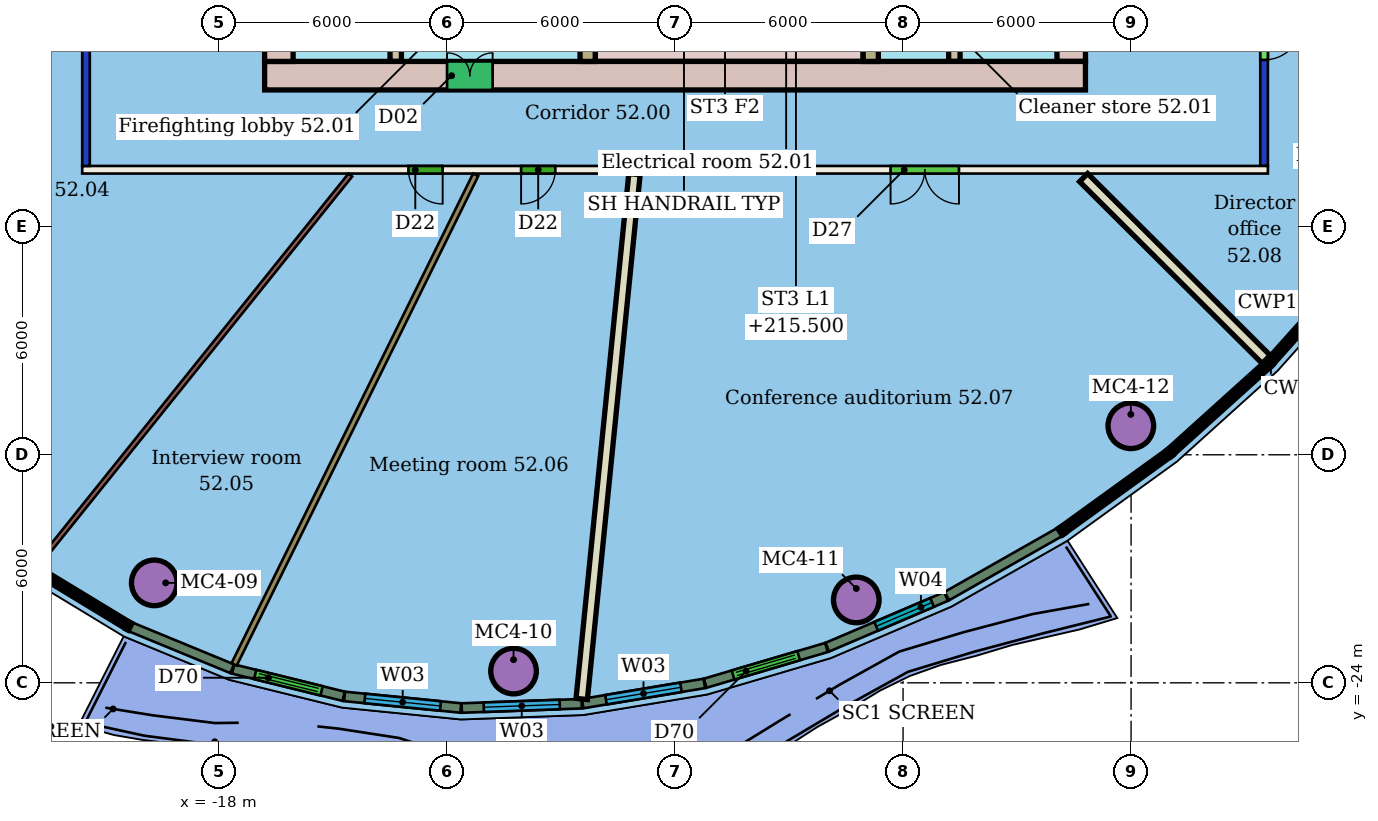
"""IFC4 building model, lengths in metres.
Left out: names, types, materials, properties, quantities, classifications, styles, units other than length and angle.
Written with IfcOpenShell. Run it as: python <this file> out.ifc"""

import sys

from ifc_helpers import new_model, si_unit, direction, frame, frame_2d, origin, origin_2d, place, context, subcontext, project, spatial, rectangle, hollow_circle, extrude, element, fill, save


model = new_model("IFC4")
c1 = context("Model", 3, precision=1e-05, world=origin(), true_north=direction((0.0, 1.0)))
c2 = subcontext(c1, "Body", "Model", "MODEL_VIEW")
j1 = project(units=[si_unit("LENGTHUNIT", "METRE"), si_unit("PLANEANGLEUNIT", "RADIAN")], contexts=[c1])
p1 = place(None, origin())
s1 = spatial("IfcSite", under=j1, at=p1, CompositionType="ELEMENT")
p2 = place(p1, origin())
s2 = spatial("IfcBuilding", under=s1, at=p2, CompositionType="ELEMENT")
p3 = place(p2, frame((0.0, 0.0, 213.7)))
s3 = spatial("IfcBuildingStorey", under=s2, at=p3, CompositionType="ELEMENT", Elevation=213.7)
for number, where, z_axis, x_axis in (
    (1, (-19.704, -21.37, 0.0), (0.0, 0.0, 1.0), (1.0, 0.0, 0.0)),
    (2, (-10.25, -23.691, 0.0), (0.0, 0.0, 1.0), (1.0, 0.0, 0.0)),
    (3, (-1.231, -21.819, 0.0), (0.0, 0.0, 1.0), (1.0, 0.0, 0.0)),
    (4, (5.993, -17.237, 0.0), (0.0, 0.0, 1.0), (1.0, 0.0, 0.0)),
):
    element("IfcColumn", number, at=place(p3, frame(where, z_axis=z_axis, x_axis=x_axis)), inside=s3, PredefinedType="COLUMN", context=c2, shape_type="SweptSolid", body=[
        extrude(hollow_circle(Radius=0.6, WallThickness=0.045, at=origin_2d()), origin(), (0.0, 0.0, 1.0), 3.45),
    ])
p4 = place(p3, frame((9.6, -10.5, 0.0), z_axis=(0.0, 0.0, 1.0), x_axis=(-1.0, 0.0, 0.0)))
e5 = element("IfcWall", 5, at=p4, inside=s3, PredefinedType="PARTITIONING", context=c2, shape_type="SweptSolid", body=[
    extrude(rectangle(XDim=31.2, YDim=0.2, at=frame_2d((15.6, 0.0))), origin(), (0.0, 0.0, 1.0), 3.45),
])
p5 = place(p4, frame((21.715, 0.0, 0.0)))
e6 = element("IfcOpeningElement", 6, at=p5, cuts=e5, PredefinedType="OPENING", context=c2, shape_type="SweptSolid", body=[
    extrude(rectangle(XDim=0.9, YDim=2.1, at=frame_2d((0.45, 1.05))), frame((0.0, 0.11, 0.0), z_axis=(0.0, -1.0, 0.0), x_axis=(1.0, 0.0, 0.0)), (0.0, 0.0, 1.0), 0.22),
])
p6 = place(p4, frame((18.751, 0.0, 0.0)))
e7 = element("IfcOpeningElement", 7, at=p6, cuts=e5, PredefinedType="OPENING", context=c2, shape_type="SweptSolid", body=[
    extrude(rectangle(XDim=0.9, YDim=2.1, at=frame_2d((0.45, 1.05))), frame((0.0, 0.11, 0.0), z_axis=(0.0, -1.0, 0.0), x_axis=(1.0, 0.0, 0.0)), (0.0, 0.0, 1.0), 0.22),
])
p7 = place(p4, frame((8.129, 0.0, 0.0)))
e8 = element("IfcOpeningElement", 8, at=p7, cuts=e5, PredefinedType="OPENING", context=c2, shape_type="SweptSolid", body=[
    extrude(rectangle(XDim=1.8, YDim=2.4, at=frame_2d((0.9, 1.2))), frame((0.0, 0.11, 0.0), z_axis=(0.0, -1.0, 0.0), x_axis=(1.0, 0.0, 0.0)), (0.0, 0.0, 1.0), 0.22),
])
p8 = place(p3, frame((-21.5, -10.4, 0.0), z_axis=(0.0, 0.0, 1.0), x_axis=(0.0, 1.0, 0.0)))
e9 = element("IfcWall", 9, at=p8, inside=s3, PredefinedType="PARTITIONING", context=c2, shape_type="SweptSolid", body=[
    extrude(rectangle(XDim=20.8, YDim=0.2, at=frame_2d((10.4, 0.0))), origin(), (0.0, 0.0, 1.0), 3.05),
])
p9 = place(p8, frame((6.094, 0.0, 0.0)))
e10 = element("IfcOpeningElement", 10, at=p9, cuts=e9, PredefinedType="OPENING", context=c2, shape_type="SweptSolid", body=[
    extrude(rectangle(XDim=1.8, YDim=2.1, at=frame_2d((0.9, 1.05))), frame((0.0, 0.11, 0.0), z_axis=(0.0, -1.0, 0.0), x_axis=(1.0, 0.0, 0.0)), (0.0, 0.0, 1.0), 0.22),
])
p10 = place(p3, frame((9.5, 10.4, 0.0), z_axis=(0.0, 0.0, 1.0), x_axis=(0.0, -1.0, 0.0)))
e11 = element("IfcWall", 11, at=p10, inside=s3, PredefinedType="PARTITIONING", context=c2, shape_type="SweptSolid", body=[
    extrude(rectangle(XDim=20.8, YDim=0.2, at=frame_2d((10.4, 0.0))), origin(), (0.0, 0.0, 1.0), 3.05),
])
p11 = place(p10, frame((17.01, 0.0, 0.0)))
e12 = element("IfcOpeningElement", 12, at=p11, cuts=e11, PredefinedType="OPENING", context=c2, shape_type="SweptSolid", body=[
    extrude(rectangle(XDim=1.0, YDim=2.4, at=frame_2d((0.5, 1.2))), frame((0.0, 0.11, 0.0), z_axis=(0.0, -1.0, 0.0), x_axis=(1.0, 0.0, 0.0)), (0.0, 0.0, 1.0), 0.22),
])
p12 = place(p10, frame((11.015, 0.0, 0.0)))
e13 = element("IfcOpeningElement", 13, at=p12, cuts=e11, PredefinedType="OPENING", context=c2, shape_type="SweptSolid", body=[
    extrude(rectangle(XDim=1.5, YDim=2.1, at=frame_2d((0.75, 1.05))), frame((0.0, 0.11, 0.0), z_axis=(0.0, -1.0, 0.0), x_axis=(1.0, 0.0, 0.0)), (0.0, 0.0, 1.0), 0.22),
])
p13 = place(p3, frame((-22.786, -20.9, 0.0), z_axis=(0.0, 0.0, 1.0), x_axis=(0.626186985821, 0.779672917824, 0.0)))
e14 = element("IfcWall", 14, at=p13, inside=s3, PredefinedType="PARTITIONING", context=c2, shape_type="SweptSolid", body=[
    extrude(rectangle(XDim=13.161, YDim=0.125, at=frame_2d((6.581, 0.0))), origin(), (0.0, 0.0, 1.0), 3.45),
])
p14 = place(p3, frame((-17.603, -23.515, 0.0), z_axis=(0.0, 0.0, 1.0), x_axis=(0.442482556449, 0.896777111237, 0.0)))
e15 = element("IfcWall", 15, at=p14, inside=s3, PredefinedType="PARTITIONING", context=c2, shape_type="SweptSolid", body=[
    extrude(rectangle(XDim=14.365, YDim=0.15, at=frame_2d((7.182, 0.0))), origin(), (0.0, 0.0, 1.0), 3.45),
])
p15 = place(p3, frame((-8.456, -24.425, 0.0), z_axis=(0.0, 0.0, 1.0), x_axis=(0.100052305019, 0.994982178866, 0.0)))
e16 = element("IfcWall", 16, at=p15, inside=s3, PredefinedType="PARTITIONING", context=c2, shape_type="SweptSolid", body=[
    extrude(rectangle(XDim=13.879, YDim=0.3, at=frame_2d((6.94, 0.0))), origin(), (0.0, 0.0, 1.0), 3.45),
])
p16 = place(p3, frame((9.555, -15.49, 0.0), z_axis=(0.0, 0.0, 1.0), x_axis=(-0.708581751717, 0.705628727543, 0.0)))
e17 = element("IfcWall", 17, at=p16, inside=s3, PredefinedType="PARTITIONING", context=c2, shape_type="SweptSolid", body=[
    extrude(rectangle(XDim=6.779, YDim=0.3, at=frame_2d((3.39, 0.0))), origin(), (0.0, 0.0, 1.0), 3.45),
])
p17 = place(p3, frame((-20.323, -22.53, 0.0), z_axis=(0.0, 0.0, 1.0), x_axis=(0.924690360412, -0.380720024901, 0.0)))
e18 = element("IfcWall", 18, at=p17, inside=s3, PredefinedType="SOLIDWALL", context=c2, shape_type="SweptSolid", body=[
    extrude(rectangle(XDim=2.886, YDim=0.25, at=frame_2d((1.443, 0.0))), origin(), (0.0, 0.0, 1.0), 3.1),
])
p18 = place(p3, frame((-17.628, -23.637, 0.0), z_axis=(0.0, 0.0, 1.0), x_axis=(0.9709618668, -0.239234306113, 0.0)))
e19 = element("IfcWall", 19, at=p18, inside=s3, PredefinedType="SOLIDWALL", context=c2, shape_type="SweptSolid", body=[
    extrude(rectangle(XDim=2.994, YDim=0.25, at=frame_2d((1.497, 0.0))), origin(), (0.0, 0.0, 1.0), 3.1),
])
p19 = place(p18, frame((0.597, 0.0, 0.0)))
e20 = element("IfcOpeningElement", 20, at=p19, cuts=e19, PredefinedType="OPENING", context=c2, shape_type="SweptSolid", body=[
    extrude(rectangle(XDim=1.8, YDim=2.4, at=frame_2d((0.9, 1.2))), frame((0.0, 0.135, 0.0), z_axis=(0.0, -1.0, 0.0), x_axis=(1.0, 0.0, 0.0)), (0.0, 0.0, 1.0), 0.27),
])
p20 = place(p3, frame((-14.696, -24.358, 0.0), z_axis=(0.0, 0.0, 1.0), x_axis=(0.995081139356, -0.099063242917, 0.0)))
e21 = element("IfcWall", 21, at=p20, inside=s3, PredefinedType="SOLIDWALL", context=c2, shape_type="SweptSolid", body=[
    extrude(rectangle(XDim=3.073, YDim=0.25, at=frame_2d((1.537, 0.0))), origin(), (0.0, 0.0, 1.0), 3.1),
])
p21 = place(p20, frame((0.537, 0.0, 0.9)))
e22 = element("IfcOpeningElement", 22, at=p21, cuts=e21, PredefinedType="OPENING", context=c2, shape_type="SweptSolid", body=[
    extrude(rectangle(XDim=2.0, YDim=2.1, at=frame_2d((1.0, 1.05))), frame((0.0, 0.135, 0.0), z_axis=(0.0, -1.0, 0.0), x_axis=(1.0, 0.0, 0.0)), (0.0, 0.0, 1.0), 0.27),
])
p22 = place(p3, frame((-11.613, -24.663, 0.0), z_axis=(0.0, 0.0, 1.0), x_axis=(0.999351383862, 0.036011270096, 0.0)))
e23 = element("IfcWall", 23, at=p22, inside=s3, PredefinedType="SOLIDWALL", context=c2, shape_type="SweptSolid", body=[
    extrude(rectangle(XDim=3.159, YDim=0.25, at=frame_2d((1.58, 0.0))), origin(), (0.0, 0.0, 1.0), 3.1),
])
p23 = place(p22, frame((0.58, 0.0, 0.9)))
e24 = element("IfcOpeningElement", 24, at=p23, cuts=e23, PredefinedType="OPENING", context=c2, shape_type="SweptSolid", body=[
    extrude(rectangle(XDim=2.0, YDim=2.1, at=frame_2d((1.0, 1.05))), frame((0.0, 0.135, 0.0), z_axis=(0.0, -1.0, 0.0), x_axis=(1.0, 0.0, 0.0)), (0.0, 0.0, 1.0), 0.27),
])
p24 = place(p3, frame((-8.432, -24.547, 0.0), z_axis=(0.0, 0.0, 1.0), x_axis=(0.986515622096, 0.163667123641, 0.0)))
e25 = element("IfcWall", 25, at=p24, inside=s3, PredefinedType="SOLIDWALL", context=c2, shape_type="SweptSolid", body=[
    extrude(rectangle(XDim=3.246, YDim=0.25, at=frame_2d((1.623, 0.0))), origin(), (0.0, 0.0, 1.0), 3.1),
])
p25 = place(p24, frame((0.623, 0.0, 0.9)))
e26 = element("IfcOpeningElement", 26, at=p25, cuts=e25, PredefinedType="OPENING", context=c2, shape_type="SweptSolid", body=[
    extrude(rectangle(XDim=2.0, YDim=2.1, at=frame_2d((1.0, 1.05))), frame((0.0, 0.135, 0.0), z_axis=(0.0, -1.0, 0.0), x_axis=(1.0, 0.0, 0.0)), (0.0, 0.0, 1.0), 0.27),
])
p26 = place(p3, frame((-5.207, -24.011, 0.0), z_axis=(0.0, 0.0, 1.0), x_axis=(0.959226347216, 0.282639018548, 0.0)))
e27 = element("IfcWall", 27, at=p26, inside=s3, PredefinedType="SOLIDWALL", context=c2, shape_type="SweptSolid", body=[
    extrude(rectangle(XDim=3.327, YDim=0.25, at=frame_2d((1.664, 0.0))), origin(), (0.0, 0.0, 1.0), 3.1),
])
p27 = place(p26, frame((0.764, 0.0, 0.0)))
e28 = element("IfcOpeningElement", 28, at=p27, cuts=e27, PredefinedType="OPENING", context=c2, shape_type="SweptSolid", body=[
    extrude(rectangle(XDim=1.8, YDim=2.4, at=frame_2d((0.9, 1.2))), frame((0.0, 0.135, 0.0), z_axis=(0.0, -1.0, 0.0), x_axis=(1.0, 0.0, 0.0)), (0.0, 0.0, 1.0), 0.27),
])
p28 = place(p3, frame((-1.994, -23.063, 0.0), z_axis=(0.0, 0.0, 1.0), x_axis=(0.919690332373, 0.392644486195, 0.0)))
e29 = element("IfcWall", 29, at=p28, inside=s3, PredefinedType="SOLIDWALL", context=c2, shape_type="SweptSolid", body=[
    extrude(rectangle(XDim=3.399, YDim=0.25, at=frame_2d((1.699, 0.0))), origin(), (0.0, 0.0, 1.0), 3.1),
])
p29 = place(p28, frame((1.399, 0.0, 0.9)))
e30 = element("IfcOpeningElement", 30, at=p29, cuts=e29, PredefinedType="OPENING", context=c2, shape_type="SweptSolid", body=[
    extrude(rectangle(XDim=1.6, YDim=2.1, at=frame_2d((0.8, 1.05))), frame((0.0, 0.135, 0.0), z_axis=(0.0, -1.0, 0.0), x_axis=(1.0, 0.0, 0.0)), (0.0, 0.0, 1.0), 0.27),
])
p30 = place(p3, frame((1.152, -21.719, 0.0), z_axis=(0.0, 0.0, 1.0), x_axis=(0.869705841478, 0.493570409666, 0.0)))
e31 = element("IfcWall", 31, at=p30, inside=s3, PredefinedType="SOLIDWALL", context=c2, shape_type="SweptSolid", body=[
    extrude(rectangle(XDim=3.412, YDim=0.25, at=frame_2d((1.706, 0.0))), origin(), (0.0, 0.0, 1.0), 3.1),
])
p31 = place(p3, frame((-16.8, -8.025, 0.0), z_axis=(0.0, 0.0, 1.0), x_axis=(1.0, 0.0, 0.0)))
e32 = element("IfcWall", 32, at=p31, inside=s3, PredefinedType="SHEAR", context=c2, shape_type="SweptSolid", body=[
    extrude(rectangle(XDim=21.6, YDim=0.75, at=frame_2d((10.8, 0.0))), origin(), (0.0, 0.0, 1.0), 3.3),
])
p32 = place(p31, frame((4.8, 0.0, 0.0)))
e33 = element("IfcOpeningElement", 33, at=p32, cuts=e32, PredefinedType="OPENING", context=c2, shape_type="SweptSolid", body=[
    extrude(rectangle(XDim=1.2, YDim=2.1, at=frame_2d((0.6, 1.05))), frame((0.0, 0.385, 0.0), z_axis=(0.0, -1.0, 0.0), x_axis=(1.0, 0.0, 0.0)), (0.0, 0.0, 1.0), 0.77),
])
p33 = place(p3, frame((-16.425, 7.65, 0.0), z_axis=(0.0, 0.0, 1.0), x_axis=(0.0, -1.0, 0.0)))
e34 = element("IfcWall", 34, at=p33, inside=s3, PredefinedType="SHEAR", context=c2, shape_type="SweptSolid", body=[
    extrude(rectangle(XDim=15.3, YDim=0.75, at=frame_2d((7.65, 0.0))), origin(), (0.0, 0.0, 1.0), 3.3),
])
p34 = place(p33, frame((11.25, 0.0, 0.0)))
e35 = element("IfcOpeningElement", 35, at=p34, cuts=e34, PredefinedType="OPENING", context=c2, shape_type="SweptSolid", body=[
    extrude(rectangle(XDim=1.2, YDim=2.1, at=frame_2d((0.6, 1.05))), frame((0.0, 0.385, 0.0), z_axis=(0.0, -1.0, 0.0), x_axis=(1.0, 0.0, 0.0)), (0.0, 0.0, 1.0), 0.77),
])
p35 = place(p33, frame((2.85, 0.0, 0.0)))
e36 = element("IfcOpeningElement", 36, at=p35, cuts=e34, PredefinedType="OPENING", context=c2, shape_type="SweptSolid", body=[
    extrude(rectangle(XDim=1.2, YDim=2.1, at=frame_2d((0.6, 1.05))), frame((0.0, 0.385, 0.0), z_axis=(0.0, -1.0, 0.0), x_axis=(1.0, 0.0, 0.0)), (0.0, 0.0, 1.0), 0.77),
])
p36 = place(p3, frame((4.425, -7.65, 0.0), z_axis=(0.0, 0.0, 1.0), x_axis=(0.0, 1.0, 0.0)))
e37 = element("IfcWall", 37, at=p36, inside=s3, PredefinedType="SHEAR", context=c2, shape_type="SweptSolid", body=[
    extrude(rectangle(XDim=15.3, YDim=0.75, at=frame_2d((7.65, 0.0))), origin(), (0.0, 0.0, 1.0), 3.3),
])
p37 = place(p36, frame((2.85, 0.0, 0.0)))
e38 = element("IfcOpeningElement", 38, at=p37, cuts=e37, PredefinedType="OPENING", context=c2, shape_type="SweptSolid", body=[
    extrude(rectangle(XDim=1.2, YDim=2.1, at=frame_2d((0.6, 1.05))), frame((0.0, 0.385, 0.0), z_axis=(0.0, -1.0, 0.0), x_axis=(1.0, 0.0, 0.0)), (0.0, 0.0, 1.0), 0.77),
])
p38 = place(p36, frame((11.25, 0.0, 0.0)))
e39 = element("IfcOpeningElement", 39, at=p38, cuts=e37, PredefinedType="OPENING", context=c2, shape_type="SweptSolid", body=[
    extrude(rectangle(XDim=1.2, YDim=2.1, at=frame_2d((0.6, 1.05))), frame((0.0, 0.385, 0.0), z_axis=(0.0, -1.0, 0.0), x_axis=(1.0, 0.0, 0.0)), (0.0, 0.0, 1.0), 0.77),
])
p39 = place(p3, frame((-13.35, 7.65, 0.0), z_axis=(0.0, 0.0, 1.0), x_axis=(0.0, -1.0, 0.0)))
e40 = element("IfcWall", 40, at=p39, inside=s3, PredefinedType="SHEAR", context=c2, shape_type="SweptSolid", body=[
    extrude(rectangle(XDim=15.3, YDim=0.3, at=frame_2d((7.65, 0.0))), origin(), (0.0, 0.0, 1.0), 3.3),
])
p40 = place(p39, frame((6.9, 0.0, 0.0)))
e41 = element("IfcOpeningElement", 41, at=p40, cuts=e40, PredefinedType="OPENING", context=c2, shape_type="SweptSolid", body=[
    extrude(rectangle(XDim=1.5, YDim=2.1, at=frame_2d((0.75, 1.05))), frame((0.0, 0.16, 0.0), z_axis=(0.0, -1.0, 0.0), x_axis=(1.0, 0.0, 0.0)), (0.0, 0.0, 1.0), 0.32),
])
p41 = place(p3, frame((1.35, -7.65, 0.0), z_axis=(0.0, 0.0, 1.0), x_axis=(0.0, 1.0, 0.0)))
e42 = element("IfcWall", 42, at=p41, inside=s3, PredefinedType="SHEAR", context=c2, shape_type="SweptSolid", body=[
    extrude(rectangle(XDim=15.3, YDim=0.3, at=frame_2d((7.65, 0.0))), origin(), (0.0, 0.0, 1.0), 3.3),
])
p42 = place(p41, frame((1.56, 0.0, 0.0)))
e43 = element("IfcOpeningElement", 43, at=p42, cuts=e42, PredefinedType="OPENING", context=c2, shape_type="SweptSolid", body=[
    extrude(rectangle(XDim=1.0, YDim=2.1, at=frame_2d((0.5, 1.05))), frame((0.0, 0.16, 0.0), z_axis=(0.0, -1.0, 0.0), x_axis=(1.0, 0.0, 0.0)), (0.0, 0.0, 1.0), 0.32),
])
p43 = place(p41, frame((6.9, 0.0, 0.0)))
e44 = element("IfcOpeningElement", 44, at=p43, cuts=e42, PredefinedType="OPENING", context=c2, shape_type="SweptSolid", body=[
    extrude(rectangle(XDim=1.5, YDim=2.1, at=frame_2d((0.75, 1.05))), frame((0.0, 0.16, 0.0), z_axis=(0.0, -1.0, 0.0), x_axis=(1.0, 0.0, 0.0)), (0.0, 0.0, 1.0), 0.32),
])
p44 = place(p3, frame((-8.3, -3.88, 0.0), z_axis=(0.0, 0.0, 1.0), x_axis=(0.0, -1.0, 0.0)))
e45 = element("IfcWall", 45, at=p44, inside=s3, PredefinedType="SHEAR", context=c2, shape_type="SweptSolid", body=[
    extrude(rectangle(XDim=3.77, YDim=0.4, at=frame_2d((1.885, 0.0))), origin(), (0.0, 0.0, 1.0), 3.3),
])
p45 = place(p44, frame((1.11, 0.0, 0.0)))
e46 = element("IfcOpeningElement", 46, at=p45, cuts=e45, PredefinedType="OPENING", context=c2, shape_type="SweptSolid", body=[
    extrude(rectangle(XDim=1.2, YDim=2.1, at=frame_2d((0.6, 1.05))), frame((0.0, 0.21, 0.0), z_axis=(0.0, -1.0, 0.0), x_axis=(1.0, 0.0, 0.0)), (0.0, 0.0, 1.0), 0.42),
])
p46 = place(p3, frame((-0.85, -3.88, 0.0), z_axis=(0.0, 0.0, 1.0), x_axis=(0.0, -1.0, 0.0)))
e47 = element("IfcWall", 47, at=p46, inside=s3, PredefinedType="SHEAR", context=c2, shape_type="SweptSolid", body=[
    extrude(rectangle(XDim=3.77, YDim=0.4, at=frame_2d((1.885, 0.0))), origin(), (0.0, 0.0, 1.0), 3.3),
])
p47 = place(p3, frame((-8.1, -7.475, 0.0), z_axis=(0.0, 0.0, 1.0), x_axis=(1.0, 0.0, 0.0)))
e48 = element("IfcWall", 48, at=p47, inside=s3, PredefinedType="SHEAR", context=c2, shape_type="SweptSolid", body=[
    extrude(rectangle(XDim=7.05, YDim=0.35, at=frame_2d((3.525, 0.0))), origin(), (0.0, 0.0, 1.0), 3.3),
])
p48 = place(p5, origin())
e49 = element("IfcDoor", 49, at=p48, inside=s3, OperationType="SINGLE_SWING_LEFT", PredefinedType="DOOR", context=c2, shape_type="SweptSolid", body=[
    extrude(rectangle(XDim=0.9, YDim=2.1, at=frame_2d((0.45, 1.05))), frame((0.0, 0.025, 0.0), z_axis=(0.0, -1.0, 0.0), x_axis=(1.0, 0.0, 0.0)), (0.0, 0.0, 1.0), 0.05),
])
fill(e6, e49)
p49 = place(p6, origin())
e50 = element("IfcDoor", 50, at=p49, inside=s3, OperationType="SINGLE_SWING_RIGHT", PredefinedType="DOOR", context=c2, shape_type="SweptSolid", body=[
    extrude(rectangle(XDim=0.9, YDim=2.1, at=frame_2d((0.45, 1.05))), frame((0.0, 0.025, 0.0), z_axis=(0.0, -1.0, 0.0), x_axis=(1.0, 0.0, 0.0)), (0.0, 0.0, 1.0), 0.05),
])
fill(e7, e50)
p50 = place(p7, origin())
e51 = element("IfcDoor", 51, at=p50, inside=s3, OperationType="DOUBLE_DOOR_SINGLE_SWING", PredefinedType="DOOR", context=c2, shape_type="SweptSolid", body=[
    extrude(rectangle(XDim=1.8, YDim=2.4, at=frame_2d((0.9, 1.2))), frame((0.0, 0.025, 0.0), z_axis=(0.0, -1.0, 0.0), x_axis=(1.0, 0.0, 0.0)), (0.0, 0.0, 1.0), 0.05),
])
fill(e8, e51)
p51 = place(p11, origin())
e52 = element("IfcDoor", 52, at=p51, inside=s3, OperationType="SINGLE_SWING_LEFT", PredefinedType="DOOR", context=c2, shape_type="SweptSolid", body=[
    extrude(rectangle(XDim=1.0, YDim=2.4, at=frame_2d((0.5, 1.2))), frame((0.0, 0.025, 0.0), z_axis=(0.0, -1.0, 0.0), x_axis=(1.0, 0.0, 0.0)), (0.0, 0.0, 1.0), 0.05),
])
fill(e12, e52)
p52 = place(p19, origin())
e53 = element("IfcDoor", 53, at=p52, inside=s3, OperationType="DOUBLE_DOOR_SLIDING", PredefinedType="DOOR", context=c2, shape_type="SweptSolid", body=[
    extrude(rectangle(XDim=1.8, YDim=2.4, at=frame_2d((0.9, 1.2))), frame((0.0, 0.025, 0.0), z_axis=(0.0, -1.0, 0.0), x_axis=(1.0, 0.0, 0.0)), (0.0, 0.0, 1.0), 0.05),
])
fill(e20, e53)
p53 = place(p21, origin())
e54 = element("IfcWindow", 54, at=p53, inside=s3, PartitioningType="SINGLE_PANEL", PredefinedType="WINDOW", context=c2, shape_type="SweptSolid", body=[
    extrude(rectangle(XDim=2.0, YDim=2.1, at=frame_2d((1.0, 1.05))), frame((0.0, 0.03, 0.0), z_axis=(0.0, -1.0, 0.0), x_axis=(1.0, 0.0, 0.0)), (0.0, 0.0, 1.0), 0.06),
])
fill(e22, e54)
p54 = place(p23, origin())
e55 = element("IfcWindow", 55, at=p54, inside=s3, PartitioningType="SINGLE_PANEL", PredefinedType="WINDOW", context=c2, shape_type="SweptSolid", body=[
    extrude(rectangle(XDim=2.0, YDim=2.1, at=frame_2d((1.0, 1.05))), frame((0.0, 0.03, 0.0), z_axis=(0.0, -1.0, 0.0), x_axis=(1.0, 0.0, 0.0)), (0.0, 0.0, 1.0), 0.06),
])
fill(e24, e55)
p55 = place(p25, origin())
e56 = element("IfcWindow", 56, at=p55, inside=s3, PartitioningType="SINGLE_PANEL", PredefinedType="WINDOW", context=c2, shape_type="SweptSolid", body=[
    extrude(rectangle(XDim=2.0, YDim=2.1, at=frame_2d((1.0, 1.05))), frame((0.0, 0.03, 0.0), z_axis=(0.0, -1.0, 0.0), x_axis=(1.0, 0.0, 0.0)), (0.0, 0.0, 1.0), 0.06),
])
fill(e26, e56)
p56 = place(p27, origin())
e57 = element("IfcDoor", 57, at=p56, inside=s3, OperationType="DOUBLE_DOOR_SLIDING", PredefinedType="DOOR", context=c2, shape_type="SweptSolid", body=[
    extrude(rectangle(XDim=1.8, YDim=2.4, at=frame_2d((0.9, 1.2))), frame((0.0, 0.025, 0.0), z_axis=(0.0, -1.0, 0.0), x_axis=(1.0, 0.0, 0.0)), (0.0, 0.0, 1.0), 0.05),
])
fill(e28, e57)
p57 = place(p29, origin())
e58 = element("IfcWindow", 58, at=p57, inside=s3, PartitioningType="SINGLE_PANEL", PredefinedType="WINDOW", context=c2, shape_type="SweptSolid", body=[
    extrude(rectangle(XDim=1.6, YDim=2.1, at=frame_2d((0.8, 1.05))), frame((0.0, 0.03, 0.0), z_axis=(0.0, -1.0, 0.0), x_axis=(1.0, 0.0, 0.0)), (0.0, 0.0, 1.0), 0.06),
])
fill(e30, e58)
p58 = place(p32, origin())
e59 = element("IfcDoor", 59, at=p58, inside=s3, OperationType="DOUBLE_DOOR_SINGLE_SWING", PredefinedType="NOTDEFINED", context=c2, shape_type="SweptSolid", body=[
    extrude(rectangle(XDim=1.2, YDim=2.1, at=frame_2d((0.6, 1.05))), frame((0.0, 0.025, 0.0), z_axis=(0.0, -1.0, 0.0), x_axis=(1.0, 0.0, 0.0)), (0.0, 0.0, 1.0), 0.05),
])
fill(e33, e59)
save(model, sys.argv[1])
